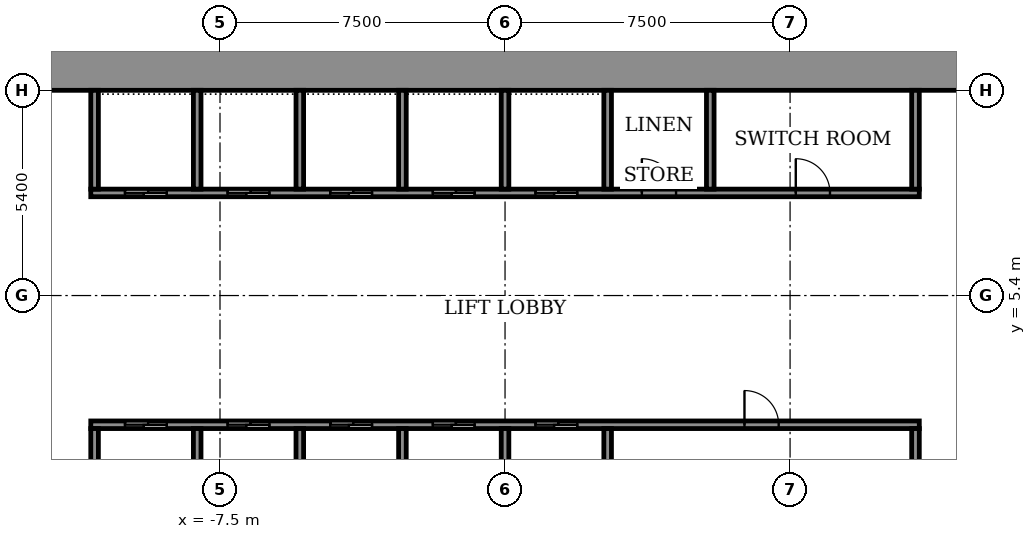
"""IFC4 building model, lengths in metres.
Left out: names, types, materials, properties, quantities, classifications, styles, units other than length and angle.
Written with IfcOpenShell. Run it as: python <this file> out.ifc"""

import sys

from ifc_helpers import new_model, si_unit, direction, frame, frame_2d, origin, place, context, subcontext, project, spatial, rectangle, extrude, element, fill, save


model = new_model("IFC4")
c1 = context("Model", 3, precision=1e-05, world=origin(), true_north=direction((0.0, 1.0)))
c2 = subcontext(c1, "Body", "Model", "MODEL_VIEW")
j1 = project(units=[si_unit("LENGTHUNIT", "METRE"), si_unit("PLANEANGLEUNIT", "RADIAN")], contexts=[c1])
p1 = place(None, origin())
s1 = spatial("IfcSite", under=j1, at=p1, CompositionType="ELEMENT")
p2 = place(p1, origin())
s2 = spatial("IfcBuilding", under=s1, at=p2, CompositionType="ELEMENT")
p3 = place(p2, frame((0.0, 0.0, 48.5)))
s3 = spatial("IfcBuildingStorey", under=s2, at=p3, CompositionType="ELEMENT", Elevation=48.5)
p4 = place(p3, frame((-14.9, 11.35, 0.0), z_axis=(0.0, 0.0, 1.0), x_axis=(1.0, 0.0, 0.0)))
e1 = element("IfcWall", 1, at=p4, inside=s3, PredefinedType="SHEAR", context=c2, shape_type="SweptSolid", body=[
    extrude(rectangle(XDim=29.8, YDim=1.1, at=frame_2d((14.9, 0.0))), origin(), (0.0, 0.0, 1.0), 3.6),
])
p5 = place(p3, frame((-10.9, 2.0, 0.0), z_axis=(0.0, 0.0, 1.0), x_axis=(1.0, 0.0, 0.0)))
e2 = element("IfcWall", 2, at=p5, inside=s3, PredefinedType="SHEAR", context=c2, shape_type="SweptSolid", body=[
    extrude(rectangle(XDim=21.8, YDim=0.2, at=frame_2d((10.9, 0.0))), origin(), (0.0, 0.0, 1.0), 3.05),
])
p6 = place(p5, frame((0.9, 0.0, 0.0)))
e3 = element("IfcOpeningElement", 3, at=p6, cuts=e2, PredefinedType="OPENING", context=c2, shape_type="SweptSolid", body=[
    extrude(rectangle(XDim=1.1, YDim=2.1, at=frame_2d((0.55, 1.05))), frame((0.0, 0.11, 0.0), z_axis=(0.0, -1.0, 0.0), x_axis=(1.0, 0.0, 0.0)), (0.0, 0.0, 1.0), 0.22),
])
p7 = place(p5, frame((3.6, 0.0, 0.0)))
e4 = element("IfcOpeningElement", 4, at=p7, cuts=e2, PredefinedType="OPENING", context=c2, shape_type="SweptSolid", body=[
    extrude(rectangle(XDim=1.1, YDim=2.1, at=frame_2d((0.55, 1.05))), frame((0.0, 0.11, 0.0), z_axis=(0.0, -1.0, 0.0), x_axis=(1.0, 0.0, 0.0)), (0.0, 0.0, 1.0), 0.22),
])
p8 = place(p5, frame((6.3, 0.0, 0.0)))
e5 = element("IfcOpeningElement", 5, at=p8, cuts=e2, PredefinedType="OPENING", context=c2, shape_type="SweptSolid", body=[
    extrude(rectangle(XDim=1.1, YDim=2.1, at=frame_2d((0.55, 1.05))), frame((0.0, 0.11, 0.0), z_axis=(0.0, -1.0, 0.0), x_axis=(1.0, 0.0, 0.0)), (0.0, 0.0, 1.0), 0.22),
])
p9 = place(p5, frame((9.0, 0.0, 0.0)))
e6 = element("IfcOpeningElement", 6, at=p9, cuts=e2, PredefinedType="OPENING", context=c2, shape_type="SweptSolid", body=[
    extrude(rectangle(XDim=1.1, YDim=2.1, at=frame_2d((0.55, 1.05))), frame((0.0, 0.11, 0.0), z_axis=(0.0, -1.0, 0.0), x_axis=(1.0, 0.0, 0.0)), (0.0, 0.0, 1.0), 0.22),
])
p10 = place(p5, frame((11.7, 0.0, 0.0)))
e7 = element("IfcOpeningElement", 7, at=p10, cuts=e2, PredefinedType="OPENING", context=c2, shape_type="SweptSolid", body=[
    extrude(rectangle(XDim=1.1, YDim=2.1, at=frame_2d((0.55, 1.05))), frame((0.0, 0.11, 0.0), z_axis=(0.0, -1.0, 0.0), x_axis=(1.0, 0.0, 0.0)), (0.0, 0.0, 1.0), 0.22),
])
p11 = place(p5, frame((17.2, 0.0, 0.0)))
e8 = element("IfcOpeningElement", 8, at=p11, cuts=e2, PredefinedType="OPENING", context=c2, shape_type="SweptSolid", body=[
    extrude(rectangle(XDim=0.9, YDim=2.1, at=frame_2d((0.45, 1.05))), frame((0.0, 0.11, 0.0), z_axis=(0.0, -1.0, 0.0), x_axis=(1.0, 0.0, 0.0)), (0.0, 0.0, 1.0), 0.22),
])
p12 = place(p3, frame((-10.9, 8.1, 0.0), z_axis=(0.0, 0.0, 1.0), x_axis=(1.0, 0.0, 0.0)))
e9 = element("IfcWall", 9, at=p12, inside=s3, PredefinedType="SHEAR", context=c2, shape_type="SweptSolid", body=[
    extrude(rectangle(XDim=21.8, YDim=0.2, at=frame_2d((10.9, 0.0))), origin(), (0.0, 0.0, 1.0), 3.05),
])
p13 = place(p12, frame((0.9, 0.0, 0.0)))
e10 = element("IfcOpeningElement", 10, at=p13, cuts=e9, PredefinedType="OPENING", context=c2, shape_type="SweptSolid", body=[
    extrude(rectangle(XDim=1.1, YDim=2.1, at=frame_2d((0.55, 1.05))), frame((0.0, 0.11, 0.0), z_axis=(0.0, -1.0, 0.0), x_axis=(1.0, 0.0, 0.0)), (0.0, 0.0, 1.0), 0.22),
])
p14 = place(p12, frame((3.6, 0.0, 0.0)))
e11 = element("IfcOpeningElement", 11, at=p14, cuts=e9, PredefinedType="OPENING", context=c2, shape_type="SweptSolid", body=[
    extrude(rectangle(XDim=1.1, YDim=2.1, at=frame_2d((0.55, 1.05))), frame((0.0, 0.11, 0.0), z_axis=(0.0, -1.0, 0.0), x_axis=(1.0, 0.0, 0.0)), (0.0, 0.0, 1.0), 0.22),
])
p15 = place(p12, frame((6.3, 0.0, 0.0)))
e12 = element("IfcOpeningElement", 12, at=p15, cuts=e9, PredefinedType="OPENING", context=c2, shape_type="SweptSolid", body=[
    extrude(rectangle(XDim=1.1, YDim=2.1, at=frame_2d((0.55, 1.05))), frame((0.0, 0.11, 0.0), z_axis=(0.0, -1.0, 0.0), x_axis=(1.0, 0.0, 0.0)), (0.0, 0.0, 1.0), 0.22),
])
p16 = place(p12, frame((9.0, 0.0, 0.0)))
e13 = element("IfcOpeningElement", 13, at=p16, cuts=e9, PredefinedType="OPENING", context=c2, shape_type="SweptSolid", body=[
    extrude(rectangle(XDim=1.1, YDim=2.1, at=frame_2d((0.55, 1.05))), frame((0.0, 0.11, 0.0), z_axis=(0.0, -1.0, 0.0), x_axis=(1.0, 0.0, 0.0)), (0.0, 0.0, 1.0), 0.22),
])
p17 = place(p12, frame((11.7, 0.0, 0.0)))
e14 = element("IfcOpeningElement", 14, at=p17, cuts=e9, PredefinedType="OPENING", context=c2, shape_type="SweptSolid", body=[
    extrude(rectangle(XDim=1.1, YDim=2.1, at=frame_2d((0.55, 1.05))), frame((0.0, 0.11, 0.0), z_axis=(0.0, -1.0, 0.0), x_axis=(1.0, 0.0, 0.0)), (0.0, 0.0, 1.0), 0.22),
])
p18 = place(p12, frame((14.5, 0.0, 0.0)))
e15 = element("IfcOpeningElement", 15, at=p18, cuts=e9, PredefinedType="OPENING", context=c2, shape_type="SweptSolid", body=[
    extrude(rectangle(XDim=0.9, YDim=2.1, at=frame_2d((0.45, 1.05))), frame((0.0, 0.11, 0.0), z_axis=(0.0, -1.0, 0.0), x_axis=(1.0, 0.0, 0.0)), (0.0, 0.0, 1.0), 0.22),
])
p19 = place(p12, frame((18.55, 0.0, 0.0)))
e16 = element("IfcOpeningElement", 16, at=p19, cuts=e9, PredefinedType="OPENING", context=c2, shape_type="SweptSolid", body=[
    extrude(rectangle(XDim=0.9, YDim=2.1, at=frame_2d((0.45, 1.05))), frame((0.0, 0.11, 0.0), z_axis=(0.0, -1.0, 0.0), x_axis=(1.0, 0.0, 0.0)), (0.0, 0.0, 1.0), 0.22),
])
for number, where, z_axis, x_axis in (
    (17, (-10.8, -0.6, 0.0), (0.0, 0.0, 1.0), (0.0, 1.0, 0.0)),
    (18, (-8.1, -0.6, 0.0), (0.0, 0.0, 1.0), (0.0, 1.0, 0.0)),
    (19, (-5.4, -0.6, 0.0), (0.0, 0.0, 1.0), (0.0, 1.0, 0.0)),
    (20, (-2.7, -0.6, 0.0), (0.0, 0.0, 1.0), (0.0, 1.0, 0.0)),
    (21, (0.0, -0.6, 0.0), (0.0, 0.0, 1.0), (0.0, 1.0, 0.0)),
    (22, (2.7, -0.6, 0.0), (0.0, 0.0, 1.0), (0.0, 1.0, 0.0)),
):
    element("IfcWall", number, at=place(p3, frame(where, z_axis=z_axis, x_axis=x_axis)), inside=s3, PredefinedType="SHEAR", context=c2, shape_type="SweptSolid", body=[
        extrude(rectangle(XDim=2.5, YDim=0.2, at=frame_2d((1.25, 0.0))), origin(), (0.0, 0.0, 1.0), 3.05),
    ])
p20 = place(p3, frame((10.8, -0.6, 0.0), z_axis=(0.0, 0.0, 1.0), x_axis=(0.0, 1.0, 0.0)))
e23 = element("IfcWall", 23, at=p20, inside=s3, PredefinedType="STANDARD", context=c2, shape_type="SweptSolid", body=[
    extrude(rectangle(XDim=2.5, YDim=0.2, at=frame_2d((1.25, 0.0))), origin(), (0.0, 0.0, 1.0), 3.05),
])
for number, where, z_axis, x_axis in (
    (24, (-10.8, 8.2, 0.0), (0.0, 0.0, 1.0), (0.0, 1.0, 0.0)),
    (25, (-8.1, 8.2, 0.0), (0.0, 0.0, 1.0), (0.0, 1.0, 0.0)),
    (26, (-5.4, 8.2, 0.0), (0.0, 0.0, 1.0), (0.0, 1.0, 0.0)),
    (27, (-2.7, 8.2, 0.0), (0.0, 0.0, 1.0), (0.0, 1.0, 0.0)),
    (28, (0.0, 8.2, 0.0), (0.0, 0.0, 1.0), (0.0, 1.0, 0.0)),
    (29, (2.7, 8.2, 0.0), (0.0, 0.0, 1.0), (0.0, 1.0, 0.0)),
):
    element("IfcWall", number, at=place(p3, frame(where, z_axis=z_axis, x_axis=x_axis)), inside=s3, PredefinedType="SHEAR", context=c2, shape_type="SweptSolid", body=[
        extrude(rectangle(XDim=2.6, YDim=0.2, at=frame_2d((1.3, 0.0))), origin(), (0.0, 0.0, 1.0), 3.05),
    ])
for number, where, z_axis, x_axis in (
    (30, (5.4, 8.2, 0.0), (0.0, 0.0, 1.0), (0.0, 1.0, 0.0)),
    (31, (10.8, 8.2, 0.0), (0.0, 0.0, 1.0), (0.0, 1.0, 0.0)),
):
    element("IfcWall", number, at=place(p3, frame(where, z_axis=z_axis, x_axis=x_axis)), inside=s3, PredefinedType="STANDARD", context=c2, shape_type="SweptSolid", body=[
        extrude(rectangle(XDim=2.6, YDim=0.2, at=frame_2d((1.3, 0.0))), origin(), (0.0, 0.0, 1.0), 3.05),
    ])
p21 = place(p6, origin())
e32 = element("IfcDoor", 32, at=p21, inside=s3, OperationType="SLIDING_TO_LEFT", PredefinedType="DOOR", context=c2, shape_type="SweptSolid", body=[
    extrude(rectangle(XDim=1.1, YDim=2.1, at=frame_2d((0.55, 1.05))), frame((0.0, 0.025, 0.0), z_axis=(0.0, -1.0, 0.0), x_axis=(1.0, 0.0, 0.0)), (0.0, 0.0, 1.0), 0.05),
])
fill(e3, e32)
p22 = place(p7, origin())
e33 = element("IfcDoor", 33, at=p22, inside=s3, OperationType="SLIDING_TO_LEFT", PredefinedType="DOOR", context=c2, shape_type="SweptSolid", body=[
    extrude(rectangle(XDim=1.1, YDim=2.1, at=frame_2d((0.55, 1.05))), frame((0.0, 0.025, 0.0), z_axis=(0.0, -1.0, 0.0), x_axis=(1.0, 0.0, 0.0)), (0.0, 0.0, 1.0), 0.05),
])
fill(e4, e33)
p23 = place(p8, origin())
e34 = element("IfcDoor", 34, at=p23, inside=s3, OperationType="SLIDING_TO_LEFT", PredefinedType="DOOR", context=c2, shape_type="SweptSolid", body=[
    extrude(rectangle(XDim=1.1, YDim=2.1, at=frame_2d((0.55, 1.05))), frame((0.0, 0.025, 0.0), z_axis=(0.0, -1.0, 0.0), x_axis=(1.0, 0.0, 0.0)), (0.0, 0.0, 1.0), 0.05),
])
fill(e5, e34)
p24 = place(p9, origin())
e35 = element("IfcDoor", 35, at=p24, inside=s3, OperationType="SLIDING_TO_LEFT", PredefinedType="DOOR", context=c2, shape_type="SweptSolid", body=[
    extrude(rectangle(XDim=1.1, YDim=2.1, at=frame_2d((0.55, 1.05))), frame((0.0, 0.025, 0.0), z_axis=(0.0, -1.0, 0.0), x_axis=(1.0, 0.0, 0.0)), (0.0, 0.0, 1.0), 0.05),
])
fill(e6, e35)
p25 = place(p10, origin())
e36 = element("IfcDoor", 36, at=p25, inside=s3, OperationType="SLIDING_TO_LEFT", PredefinedType="DOOR", context=c2, shape_type="SweptSolid", body=[
    extrude(rectangle(XDim=1.1, YDim=2.1, at=frame_2d((0.55, 1.05))), frame((0.0, 0.025, 0.0), z_axis=(0.0, -1.0, 0.0), x_axis=(1.0, 0.0, 0.0)), (0.0, 0.0, 1.0), 0.05),
])
fill(e7, e36)
p26 = place(p13, origin())
e37 = element("IfcDoor", 37, at=p26, inside=s3, OperationType="SLIDING_TO_LEFT", PredefinedType="DOOR", context=c2, shape_type="SweptSolid", body=[
    extrude(rectangle(XDim=1.1, YDim=2.1, at=frame_2d((0.55, 1.05))), frame((0.0, 0.025, 0.0), z_axis=(0.0, -1.0, 0.0), x_axis=(1.0, 0.0, 0.0)), (0.0, 0.0, 1.0), 0.05),
])
fill(e10, e37)
p27 = place(p14, origin())
e38 = element("IfcDoor", 38, at=p27, inside=s3, OperationType="SLIDING_TO_LEFT", PredefinedType="DOOR", context=c2, shape_type="SweptSolid", body=[
    extrude(rectangle(XDim=1.1, YDim=2.1, at=frame_2d((0.55, 1.05))), frame((0.0, 0.025, 0.0), z_axis=(0.0, -1.0, 0.0), x_axis=(1.0, 0.0, 0.0)), (0.0, 0.0, 1.0), 0.05),
])
fill(e11, e38)
p28 = place(p15, origin())
e39 = element("IfcDoor", 39, at=p28, inside=s3, OperationType="SLIDING_TO_LEFT", PredefinedType="DOOR", context=c2, shape_type="SweptSolid", body=[
    extrude(rectangle(XDim=1.1, YDim=2.1, at=frame_2d((0.55, 1.05))), frame((0.0, 0.025, 0.0), z_axis=(0.0, -1.0, 0.0), x_axis=(1.0, 0.0, 0.0)), (0.0, 0.0, 1.0), 0.05),
])
fill(e12, e39)
p29 = place(p16, origin())
e40 = element("IfcDoor", 40, at=p29, inside=s3, OperationType="SLIDING_TO_LEFT", PredefinedType="DOOR", context=c2, shape_type="SweptSolid", body=[
    extrude(rectangle(XDim=1.1, YDim=2.1, at=frame_2d((0.55, 1.05))), frame((0.0, 0.025, 0.0), z_axis=(0.0, -1.0, 0.0), x_axis=(1.0, 0.0, 0.0)), (0.0, 0.0, 1.0), 0.05),
])
fill(e13, e40)
p30 = place(p17, origin())
e41 = element("IfcDoor", 41, at=p30, inside=s3, OperationType="SLIDING_TO_LEFT", PredefinedType="DOOR", context=c2, shape_type="SweptSolid", body=[
    extrude(rectangle(XDim=1.1, YDim=2.1, at=frame_2d((0.55, 1.05))), frame((0.0, 0.025, 0.0), z_axis=(0.0, -1.0, 0.0), x_axis=(1.0, 0.0, 0.0)), (0.0, 0.0, 1.0), 0.05),
])
fill(e14, e41)
p31 = place(p11, origin())
e42 = element("IfcDoor", 42, at=p31, inside=s3, OperationType="SINGLE_SWING_LEFT", PredefinedType="DOOR", context=c2, shape_type="SweptSolid", body=[
    extrude(rectangle(XDim=0.9, YDim=2.1, at=frame_2d((0.45, 1.05))), frame((0.0, 0.025, 0.0), z_axis=(0.0, -1.0, 0.0), x_axis=(1.0, 0.0, 0.0)), (0.0, 0.0, 1.0), 0.05),
])
fill(e8, e42)
p32 = place(p18, origin())
e43 = element("IfcDoor", 43, at=p32, inside=s3, OperationType="SINGLE_SWING_RIGHT", PredefinedType="DOOR", context=c2, shape_type="SweptSolid", body=[
    extrude(rectangle(XDim=0.9, YDim=2.1, at=frame_2d((0.45, 1.05))), frame((0.0, 0.025, 0.0), z_axis=(0.0, -1.0, 0.0), x_axis=(1.0, 0.0, 0.0)), (0.0, 0.0, 1.0), 0.05),
])
fill(e15, e43)
p33 = place(p19, origin())
e44 = element("IfcDoor", 44, at=p33, inside=s3, OperationType="SINGLE_SWING_LEFT", PredefinedType="DOOR", context=c2, shape_type="SweptSolid", body=[
    extrude(rectangle(XDim=0.9, YDim=2.1, at=frame_2d((0.45, 1.05))), frame((0.0, 0.025, 0.0), z_axis=(0.0, -1.0, 0.0), x_axis=(1.0, 0.0, 0.0)), (0.0, 0.0, 1.0), 0.05),
])
fill(e16, e44)
save(model, sys.argv[1])
